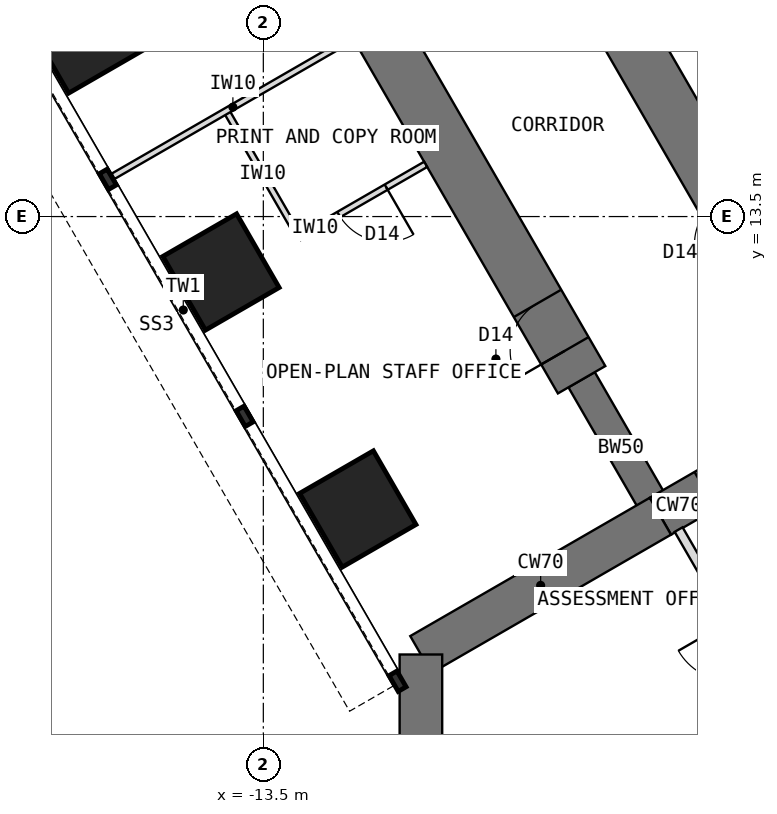
"""IFC4 building model, lengths in metres.
Left out: names, types, materials, properties, quantities, classifications, styles, units other than length and angle.
Written with IfcOpenShell. Run it as: python <this file> out.ifc"""

import sys

from ifc_helpers import new_model, si_unit, direction, frame, frame_2d, origin, origin_2d, place, context, subcontext, project, spatial, rectangle, extrude, element, fill, save


model = new_model("IFC4")
c1 = context("Model", 3, precision=1e-05, world=origin(), true_north=direction((0.0, 1.0)))
c2 = subcontext(c1, "Body", "Model", "MODEL_VIEW")
j1 = project(units=[si_unit("LENGTHUNIT", "METRE"), si_unit("PLANEANGLEUNIT", "RADIAN")], contexts=[c1])
p1 = place(None, origin())
s1 = spatial("IfcSite", under=j1, at=p1, CompositionType="ELEMENT")
p2 = place(p1, origin())
s2 = spatial("IfcBuilding", under=s1, at=p2, CompositionType="ELEMENT")
p3 = place(p2, frame((0.0, 0.0, 76.5)))
s3 = spatial("IfcBuildingStorey", under=s2, at=p3, CompositionType="ELEMENT", Elevation=76.5)
p4 = place(p3, frame((-3.939, 10.322, 0.0), z_axis=(0.0, 0.0, 1.0), x_axis=(-0.866019471182, -0.500010275428, 0.0)))
e1 = element("IfcWall", 1, at=p4, inside=s3, PredefinedType="SHEAR", context=c2, shape_type="SweptSolid", body=[
    extrude(rectangle(XDim=3.5, YDim=0.7, at=frame_2d((1.75, 0.0))), origin(), (0.0, 0.0, 1.0), 4.0),
])
p5 = place(p4, frame((0.85, 0.0, 0.0)))
e2 = element("IfcOpeningElement", 2, at=p5, cuts=e1, PredefinedType="OPENING", context=c2, shape_type="SweptSolid", body=[
    extrude(rectangle(XDim=1.8, YDim=2.1, at=frame_2d((0.9, 1.05))), frame((0.0, 0.36, 0.0), z_axis=(0.0, -1.0, 0.0), x_axis=(1.0, 0.0, 0.0)), (0.0, 0.0, 1.0), 0.72),
])
p6 = place(p3, frame((-6.97, 8.572, 0.0), z_axis=(0.0, 0.0, 1.0), x_axis=(-0.866034513004, -0.499984222037, 0.0)))
e3 = element("IfcWall", 3, at=p6, inside=s3, PredefinedType="SHEAR", context=c2, shape_type="SweptSolid", body=[
    extrude(rectangle(XDim=4.548, YDim=0.7, at=frame_2d((2.274, 0.0))), origin(), (0.0, 0.0, 1.0), 4.0),
])
p7 = place(p3, frame((-10.908, 6.298, 0.0), z_axis=(0.0, 0.0, 1.0), x_axis=(0.0, -1.0, 0.0)))
e4 = element("IfcWall", 4, at=p7, inside=s3, PredefinedType="SHEAR", context=c2, shape_type="SweptSolid", body=[
    extrude(rectangle(XDim=12.596, YDim=0.7, at=frame_2d((6.298, 0.0))), origin(), (0.0, 0.0, 1.0), 4.0),
])
p8 = place(p3, frame((-6.97, 8.572, 0.0), z_axis=(0.0, 0.0, 1.0), x_axis=(-0.499988811324, 0.866031863473, 0.0)))
e5 = element("IfcWall", 5, at=p8, inside=s3, PredefinedType="SHEAR", context=c2, shape_type="SweptSolid", body=[
    extrude(rectangle(XDim=2.592, YDim=0.5, at=frame_2d((1.296, 0.0))), origin(), (0.0, 0.0, 1.0), 4.0),
])
p9 = place(p3, frame((-8.266, 10.816, 0.0), z_axis=(0.0, 0.0, 1.0), x_axis=(-0.499996231654, 0.866027579429, 0.0)))
e6 = element("IfcWall", 6, at=p9, inside=s3, PredefinedType="SHEAR", context=c2, shape_type="SweptSolid", body=[
    extrude(rectangle(XDim=13.2, YDim=0.9, at=frame_2d((6.6, 0.0))), origin(), (0.0, 0.0, 1.0), 4.0),
])
p10 = place(p9, frame((0.55, 0.0, 0.0)))
e7 = element("IfcOpeningElement", 7, at=p10, cuts=e6, PredefinedType="OPENING", context=c2, shape_type="SweptSolid", body=[
    extrude(rectangle(XDim=0.9, YDim=2.1, at=frame_2d((0.45, 1.05))), frame((0.0, 0.46, 0.0), z_axis=(0.0, -1.0, 0.0), x_axis=(1.0, 0.0, 0.0)), (0.0, 0.0, 1.0), 0.92),
])
p11 = place(p9, frame((7.3, 0.0, 0.0)))
e8 = element("IfcOpeningElement", 8, at=p11, cuts=e6, PredefinedType="OPENING", context=c2, shape_type="SweptSolid", body=[
    extrude(rectangle(XDim=0.9, YDim=2.1, at=frame_2d((0.45, 1.05))), frame((0.0, 0.46, 0.0), z_axis=(0.0, -1.0, 0.0), x_axis=(1.0, 0.0, 0.0)), (0.0, 0.0, 1.0), 0.92),
])
p12 = place(p3, frame((-5.234, 12.566, 0.0), z_axis=(0.0, 0.0, 1.0), x_axis=(-0.500010103361, 0.866019570528, 0.0)))
e9 = element("IfcWall", 9, at=p12, inside=s3, PredefinedType="SHEAR", context=c2, shape_type="SweptSolid", body=[
    extrude(rectangle(XDim=13.2, YDim=0.9, at=frame_2d((6.6, 0.0))), origin(), (0.0, 0.0, 1.0), 4.0),
])
p13 = place(p12, frame((0.55, 0.0, 0.0)))
e10 = element("IfcOpeningElement", 10, at=p13, cuts=e9, PredefinedType="OPENING", context=c2, shape_type="SweptSolid", body=[
    extrude(rectangle(XDim=0.9, YDim=2.1, at=frame_2d((0.45, 1.05))), frame((0.0, 0.46, 0.0), z_axis=(0.0, -1.0, 0.0), x_axis=(1.0, 0.0, 0.0)), (0.0, 0.0, 1.0), 0.92),
])
p14 = place(p12, frame((7.3, 0.0, 0.0)))
e11 = element("IfcOpeningElement", 11, at=p14, cuts=e9, PredefinedType="OPENING", context=c2, shape_type="SweptSolid", body=[
    extrude(rectangle(XDim=0.9, YDim=2.1, at=frame_2d((0.45, 1.05))), frame((0.0, 0.46, 0.0), z_axis=(0.0, -1.0, 0.0), x_axis=(1.0, 0.0, 0.0)), (0.0, 0.0, 1.0), 0.92),
])
for number, where, z_axis, x_axis in (
    (12, (-11.946, 8.691, 0.0), (0.0, 0.0, 1.0), (0.866, 0.5, 0.0)),
    (13, (-14.196, 12.588, 0.0), (0.0, 0.0, 1.0), (0.866, 0.5, 0.0)),
    (14, (-16.446, 16.486, 0.0), (0.0, 0.0, 1.0), (0.866, 0.5, 0.0)),
):
    element("IfcColumn", number, at=place(p3, frame(where, z_axis=z_axis, x_axis=x_axis)), inside=s3, PredefinedType="COLUMN", context=c2, shape_type="SweptSolid", body=[
        extrude(rectangle(XDim=1.4, YDim=1.4, at=origin_2d()), origin(), (0.0, 0.0, 1.0), 4.0),
    ])
p15 = place(p3, frame((-12.03, 16.437, 0.0), z_axis=(0.0, 0.0, 1.0), x_axis=(-0.866035472144, -0.499982560684, 0.0)))
e15 = element("IfcWall", 15, at=p15, inside=s3, PredefinedType="PARTITIONING", context=c2, shape_type="SweptSolid", body=[
    extrude(rectangle(XDim=4.55, YDim=0.1, at=frame_2d((2.275, 0.0))), origin(), (0.0, 0.0, 1.0), 3.8),
])
p16 = place(p3, frame((-12.909, 13.158, 0.0), z_axis=(0.0, 0.0, 1.0), x_axis=(-0.499957262057, 0.866050077142, 0.0)))
e16 = element("IfcWall", 16, at=p16, inside=s3, PredefinedType="PARTITIONING", context=c2, shape_type="SweptSolid", body=[
    extrude(rectangle(XDim=2.4, YDim=0.1, at=frame_2d((1.2, 0.0))), origin(), (0.0, 0.0, 1.0), 3.8),
])
p17 = place(p3, frame((-10.83, 14.359, 0.0), z_axis=(0.0, 0.0, 1.0), x_axis=(-0.865980596518, -0.500077600433, 0.0)))
e17 = element("IfcWall", 17, at=p17, inside=s3, PredefinedType="PARTITIONING", context=c2, shape_type="SweptSolid", body=[
    extrude(rectangle(XDim=2.4, YDim=0.1, at=frame_2d((1.2, 0.0))), origin(), (0.0, 0.0, 1.0), 3.8),
])
p18 = place(p17, frame((0.75, 0.0, 0.0)))
e18 = element("IfcOpeningElement", 18, at=p18, cuts=e17, PredefinedType="OPENING", context=c2, shape_type="SweptSolid", body=[
    extrude(rectangle(XDim=0.9, YDim=2.1, at=frame_2d((0.45, 1.05))), frame((0.0, 0.06, 0.0), z_axis=(0.0, -1.0, 0.0), x_axis=(1.0, 0.0, 0.0)), (0.0, 0.0, 1.0), 0.12),
])
p19 = place(p3, frame((-4.436, 4.483, 0.0), z_axis=(0.0, 0.0, 1.0), x_axis=(-0.500017246033, 0.866015446554, 0.0)))
e19 = element("IfcWall", 19, at=p19, inside=s3, PredefinedType="PARTITIONING", context=c2, shape_type="SweptSolid", body=[
    extrude(rectangle(XDim=4.469, YDim=0.15, at=frame_2d((2.234, 0.0))), origin(), (0.0, 0.0, 1.0), 3.8),
])
p20 = place(p19, frame((1.744, 0.0, 0.0)))
e20 = element("IfcOpeningElement", 20, at=p20, cuts=e19, PredefinedType="OPENING", context=c2, shape_type="SweptSolid", body=[
    extrude(rectangle(XDim=1.0, YDim=2.1, at=frame_2d((0.5, 1.05))), frame((0.0, 0.085, 0.0), z_axis=(0.0, -1.0, 0.0), x_axis=(1.0, 0.0, 0.0)), (0.0, 0.0, 1.0), 0.17),
])
p21 = place(p5, origin())
e21 = element("IfcDoor", 21, at=p21, inside=s3, OperationType="DOUBLE_DOOR_DOUBLE_SWING", PredefinedType="DOOR", context=c2, shape_type="SweptSolid", body=[
    extrude(rectangle(XDim=1.72, YDim=2.06, at=frame_2d((0.9, 1.03))), frame((0.0, 0.025, 0.0), z_axis=(0.0, -1.0, 0.0), x_axis=(1.0, 0.0, 0.0)), (0.0, 0.0, 1.0), 0.05),
    extrude(rectangle(XDim=0.04, YDim=2.1, at=frame_2d((0.02, 1.05))), frame((0.0, 0.35, 0.0), z_axis=(0.0, -1.0, 0.0), x_axis=(1.0, 0.0, 0.0)), (0.0, 0.0, 1.0), 0.699),
    extrude(rectangle(XDim=0.04, YDim=2.1, at=frame_2d((1.78, 1.05))), frame((0.0, 0.35, 0.0), z_axis=(0.0, -1.0, 0.0), x_axis=(1.0, 0.0, 0.0)), (0.0, 0.0, 1.0), 0.699),
    extrude(rectangle(XDim=1.72, YDim=0.04, at=frame_2d((0.9, 2.08))), frame((0.0, 0.35, 0.0), z_axis=(0.0, -1.0, 0.0), x_axis=(1.0, 0.0, 0.0)), (0.0, 0.0, 1.0), 0.699),
])
fill(e2, e21)
p22 = place(p18, origin())
e22 = element("IfcDoor", 22, at=p22, inside=s3, OperationType="SINGLE_SWING_LEFT", PredefinedType="DOOR", context=c2, shape_type="SweptSolid", body=[
    extrude(rectangle(XDim=0.9, YDim=2.1, at=frame_2d((0.45, 1.05))), frame((0.0, 0.025, 0.0), z_axis=(0.0, -1.0, 0.0), x_axis=(1.0, 0.0, 0.0)), (0.0, 0.0, 1.0), 0.05),
])
fill(e18, e22)
p23 = place(p10, origin())
e23 = element("IfcDoor", 23, at=p23, inside=s3, OperationType="SINGLE_SWING_LEFT", PredefinedType="DOOR", context=c2, shape_type="SweptSolid", body=[
    extrude(rectangle(XDim=0.82, YDim=2.06, at=frame_2d((0.45, 1.03))), frame((0.0, 0.025, 0.0), z_axis=(0.0, -1.0, 0.0), x_axis=(1.0, 0.0, 0.0)), (0.0, 0.0, 1.0), 0.05),
    extrude(rectangle(XDim=0.04, YDim=2.1, at=frame_2d((0.02, 1.05))), frame((0.0, 0.45, 0.0), z_axis=(0.0, -1.0, 0.0), x_axis=(1.0, 0.0, 0.0)), (0.0, 0.0, 1.0), 0.899),
    extrude(rectangle(XDim=0.04, YDim=2.1, at=frame_2d((0.88, 1.05))), frame((0.0, 0.45, 0.0), z_axis=(0.0, -1.0, 0.0), x_axis=(1.0, 0.0, 0.0)), (0.0, 0.0, 1.0), 0.899),
    extrude(rectangle(XDim=0.82, YDim=0.04, at=frame_2d((0.45, 2.08))), frame((0.0, 0.45, 0.0), z_axis=(0.0, -1.0, 0.0), x_axis=(1.0, 0.0, 0.0)), (0.0, 0.0, 1.0), 0.899),
])
fill(e7, e23)
save(model, sys.argv[1])
